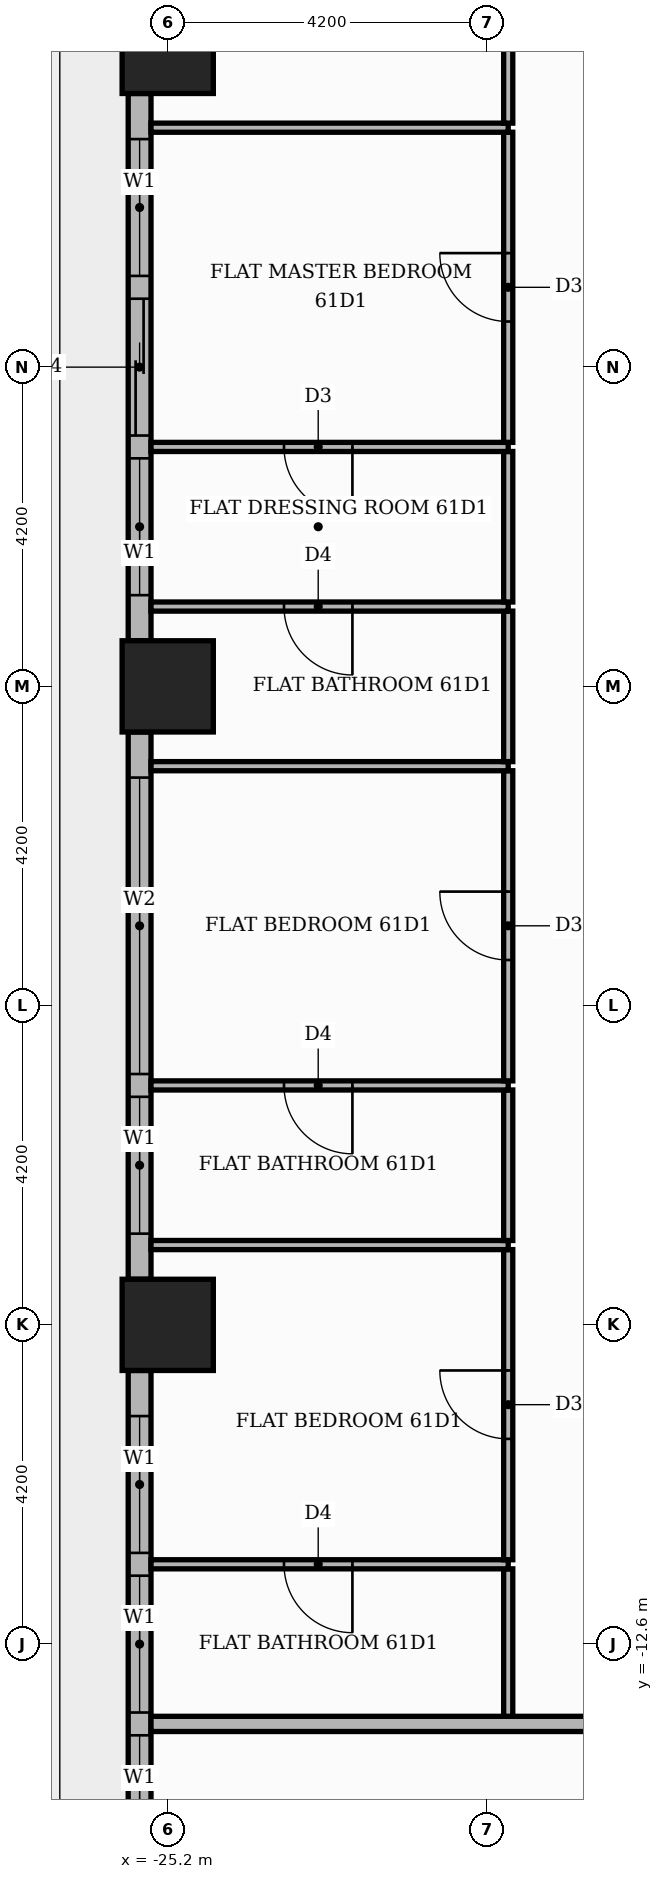
"""IFC4 building model, lengths in metres.
Left out: names, types, materials, properties, quantities, classifications, styles, units other than length and angle.
Written with IfcOpenShell. Run it as: python <this file> out.ifc"""

import sys

from ifc_helpers import new_model, si_unit, direction, frame, frame_2d, origin, origin_2d, place, context, subcontext, project, spatial, rectangle, extrude, element, fill, save


model = new_model("IFC4")
c1 = context("Model", 3, precision=1e-05, world=origin(), true_north=direction((0.0, 1.0)))
c2 = subcontext(c1, "Body", "Model", "MODEL_VIEW")
j1 = project(units=[si_unit("LENGTHUNIT", "METRE"), si_unit("PLANEANGLEUNIT", "RADIAN")], contexts=[c1])
p1 = place(None, origin())
s1 = spatial("IfcSite", under=j1, at=p1, CompositionType="ELEMENT")
p2 = place(p1, origin())
s2 = spatial("IfcBuilding", under=s1, at=p2, CompositionType="ELEMENT")
p3 = place(p2, frame((0.0, 0.0, 256.2)))
s3 = spatial("IfcBuildingStorey", under=s2, at=p3, CompositionType="ELEMENT", Elevation=256.2)
for number, where, z_axis, x_axis in (
    (1, (-25.2, 0.0, 0.0), (0.0, 0.0, 1.0), (1.0, 0.0, 0.0)),
    (2, (-25.2, -8.4, 0.0), (0.0, 0.0, 1.0), (1.0, 0.0, 0.0)),
    (3, (-25.2, 8.4, 0.0), (0.0, 0.0, 1.0), (1.0, 0.0, 0.0)),
):
    element("IfcColumn", number, at=place(p3, frame(where, z_axis=z_axis, x_axis=x_axis)), inside=s3, PredefinedType="COLUMN", context=c2, shape_type="SweptSolid", body=[
        extrude(rectangle(XDim=1.2, YDim=1.2, at=origin_2d()), origin(), (0.0, 0.0, 1.0), 3.9),
    ])
p4 = place(p3, frame((-25.57, 7.8, 0.0), z_axis=(0.0, 0.0, 1.0), x_axis=(0.0, -1.0, 0.0)))
e4 = element("IfcWall", 4, at=p4, inside=s3, PredefinedType="STANDARD", context=c2, shape_type="SweptSolid", body=[
    extrude(rectangle(XDim=7.2, YDim=0.3, at=frame_2d((3.6, 0.0))), origin(), (0.0, 0.0, 1.0), 3.48),
])
p5 = place(p4, frame((0.6, 0.0, 0.9)))
e5 = element("IfcOpeningElement", 5, at=p5, cuts=e4, PredefinedType="OPENING", context=c2, shape_type="SweptSolid", body=[
    extrude(rectangle(XDim=1.8, YDim=2.1, at=frame_2d((0.9, 1.05))), frame((0.0, 0.16, 0.0), z_axis=(0.0, -1.0, 0.0), x_axis=(1.0, 0.0, 0.0)), (0.0, 0.0, 1.0), 0.32),
])
p6 = place(p4, frame((2.7, 0.0, 0.0)))
e6 = element("IfcOpeningElement", 6, at=p6, cuts=e4, PredefinedType="OPENING", context=c2, shape_type="SweptSolid", body=[
    extrude(rectangle(XDim=1.8, YDim=2.4, at=frame_2d((0.9, 1.2))), frame((0.0, 0.16, 0.0), z_axis=(0.0, -1.0, 0.0), x_axis=(1.0, 0.0, 0.0)), (0.0, 0.0, 1.0), 0.32),
])
p7 = place(p4, frame((4.8, 0.0, 0.9)))
e7 = element("IfcOpeningElement", 7, at=p7, cuts=e4, PredefinedType="OPENING", context=c2, shape_type="SweptSolid", body=[
    extrude(rectangle(XDim=1.8, YDim=2.1, at=frame_2d((0.9, 1.05))), frame((0.0, 0.16, 0.0), z_axis=(0.0, -1.0, 0.0), x_axis=(1.0, 0.0, 0.0)), (0.0, 0.0, 1.0), 0.32),
])
p8 = place(p3, frame((-25.57, -0.6, 0.0), z_axis=(0.0, 0.0, 1.0), x_axis=(0.0, -1.0, 0.0)))
e8 = element("IfcWall", 8, at=p8, inside=s3, PredefinedType="STANDARD", context=c2, shape_type="SweptSolid", body=[
    extrude(rectangle(XDim=7.2, YDim=0.3, at=frame_2d((3.6, 0.0))), origin(), (0.0, 0.0, 1.0), 3.48),
])
p9 = place(p8, frame((0.6, 0.0, 0.9)))
e9 = element("IfcOpeningElement", 9, at=p9, cuts=e8, PredefinedType="OPENING", context=c2, shape_type="SweptSolid", body=[
    extrude(rectangle(XDim=3.9, YDim=2.1, at=frame_2d((1.95, 1.05))), frame((0.0, 0.16, 0.0), z_axis=(0.0, -1.0, 0.0), x_axis=(1.0, 0.0, 0.0)), (0.0, 0.0, 1.0), 0.32),
])
p10 = place(p8, frame((4.8, 0.0, 0.9)))
e10 = element("IfcOpeningElement", 10, at=p10, cuts=e8, PredefinedType="OPENING", context=c2, shape_type="SweptSolid", body=[
    extrude(rectangle(XDim=1.8, YDim=2.1, at=frame_2d((0.9, 1.05))), frame((0.0, 0.16, 0.0), z_axis=(0.0, -1.0, 0.0), x_axis=(1.0, 0.0, 0.0)), (0.0, 0.0, 1.0), 0.32),
])
p11 = place(p3, frame((-25.57, -9.0, 0.0), z_axis=(0.0, 0.0, 1.0), x_axis=(0.0, -1.0, 0.0)))
e11 = element("IfcWall", 11, at=p11, inside=s3, PredefinedType="STANDARD", context=c2, shape_type="SweptSolid", body=[
    extrude(rectangle(XDim=7.2, YDim=0.3, at=frame_2d((3.6, 0.0))), origin(), (0.0, 0.0, 1.0), 3.48),
])
p12 = place(p11, frame((0.6, 0.0, 0.9)))
e12 = element("IfcOpeningElement", 12, at=p12, cuts=e11, PredefinedType="OPENING", context=c2, shape_type="SweptSolid", body=[
    extrude(rectangle(XDim=1.8, YDim=2.1, at=frame_2d((0.9, 1.05))), frame((0.0, 0.16, 0.0), z_axis=(0.0, -1.0, 0.0), x_axis=(1.0, 0.0, 0.0)), (0.0, 0.0, 1.0), 0.32),
])
p13 = place(p11, frame((2.7, 0.0, 0.9)))
e13 = element("IfcOpeningElement", 13, at=p13, cuts=e11, PredefinedType="OPENING", context=c2, shape_type="SweptSolid", body=[
    extrude(rectangle(XDim=1.8, YDim=2.1, at=frame_2d((0.9, 1.05))), frame((0.0, 0.16, 0.0), z_axis=(0.0, -1.0, 0.0), x_axis=(1.0, 0.0, 0.0)), (0.0, 0.0, 1.0), 0.32),
])
p14 = place(p11, frame((4.8, 0.0, 0.9)))
e14 = element("IfcOpeningElement", 14, at=p14, cuts=e11, PredefinedType="OPENING", context=c2, shape_type="SweptSolid", body=[
    extrude(rectangle(XDim=1.8, YDim=2.1, at=frame_2d((0.9, 1.05))), frame((0.0, 0.16, 0.0), z_axis=(0.0, -1.0, 0.0), x_axis=(1.0, 0.0, 0.0)), (0.0, 0.0, 1.0), 0.32),
])
p15 = place(p3, frame((-25.42, -13.65, 0.0), z_axis=(0.0, 0.0, 1.0), x_axis=(1.0, 0.0, 0.0)))
e15 = element("IfcWall", 15, at=p15, inside=s3, PredefinedType="PARTITIONING", context=c2, shape_type="SweptSolid", body=[
    extrude(rectangle(XDim=39.07, YDim=0.2, at=frame_2d((19.535, 0.0))), origin(), (0.0, 0.0, 1.0), 3.48),
])
p16 = place(p15, frame((14.37, 0.0, 0.0)))
e16 = element("IfcOpeningElement", 16, at=p16, cuts=e15, PredefinedType="OPENING", context=c2, shape_type="SweptSolid", body=[
    extrude(rectangle(XDim=1.1, YDim=2.4, at=frame_2d((0.55, 1.2))), frame((0.0, 0.11, 0.0), z_axis=(0.0, -1.0, 0.0), x_axis=(1.0, 0.0, 0.0)), (0.0, 0.0, 1.0), 0.22),
])
p17 = place(p3, frame((-20.72, -13.55, 0.0), z_axis=(0.0, 0.0, 1.0), x_axis=(0.0, 1.0, 0.0)))
e17 = element("IfcWall", 17, at=p17, inside=s3, PredefinedType="PARTITIONING", context=c2, shape_type="SweptSolid", body=[
    extrude(rectangle(XDim=1.94, YDim=0.12, at=frame_2d((0.97, 0.0))), origin(), (0.0, 0.0, 1.0), 3.48),
])
p18 = place(p3, frame((-25.42, -11.55, 0.0), z_axis=(0.0, 0.0, 1.0), x_axis=(1.0, 0.0, 0.0)))
e18 = element("IfcWall", 18, at=p18, inside=s3, PredefinedType="PARTITIONING", context=c2, shape_type="SweptSolid", body=[
    extrude(rectangle(XDim=4.7, YDim=0.12, at=frame_2d((2.35, 0.0))), origin(), (0.0, 0.0, 1.0), 3.48),
])
p19 = place(p18, frame((1.75, 0.0, 0.0)))
e19 = element("IfcOpeningElement", 19, at=p19, cuts=e18, PredefinedType="OPENING", context=c2, shape_type="SweptSolid", body=[
    extrude(rectangle(XDim=0.9, YDim=2.1, at=frame_2d((0.45, 1.05))), frame((0.0, 0.07, 0.0), z_axis=(0.0, -1.0, 0.0), x_axis=(1.0, 0.0, 0.0)), (0.0, 0.0, 1.0), 0.14),
])
p20 = place(p3, frame((-20.72, -11.49, 0.0), z_axis=(0.0, 0.0, 1.0), x_axis=(0.0, 1.0, 0.0)))
e20 = element("IfcWall", 20, at=p20, inside=s3, PredefinedType="PARTITIONING", context=c2, shape_type="SweptSolid", body=[
    extrude(rectangle(XDim=4.08, YDim=0.12, at=frame_2d((2.04, 0.0))), origin(), (0.0, 0.0, 1.0), 3.48),
])
p21 = place(p20, frame((1.59, 0.0, 0.0)))
e21 = element("IfcOpeningElement", 21, at=p21, cuts=e20, PredefinedType="OPENING", context=c2, shape_type="SweptSolid", body=[
    extrude(rectangle(XDim=0.9, YDim=2.1, at=frame_2d((0.45, 1.05))), frame((0.0, 0.07, 0.0), z_axis=(0.0, -1.0, 0.0), x_axis=(1.0, 0.0, 0.0)), (0.0, 0.0, 1.0), 0.14),
])
p22 = place(p3, frame((-25.42, -7.35, 0.0), z_axis=(0.0, 0.0, 1.0), x_axis=(1.0, 0.0, 0.0)))
e22 = element("IfcWall", 22, at=p22, inside=s3, PredefinedType="PARTITIONING", context=c2, shape_type="SweptSolid", body=[
    extrude(rectangle(XDim=4.7, YDim=0.12, at=frame_2d((2.35, 0.0))), origin(), (0.0, 0.0, 1.0), 3.48),
])
p23 = place(p3, frame((-20.72, -7.29, 0.0), z_axis=(0.0, 0.0, 1.0), x_axis=(0.0, 1.0, 0.0)))
e23 = element("IfcWall", 23, at=p23, inside=s3, PredefinedType="PARTITIONING", context=c2, shape_type="SweptSolid", body=[
    extrude(rectangle(XDim=1.98, YDim=0.12, at=frame_2d((0.99, 0.0))), origin(), (0.0, 0.0, 1.0), 3.48),
])
p24 = place(p3, frame((-25.42, -5.25, 0.0), z_axis=(0.0, 0.0, 1.0), x_axis=(1.0, 0.0, 0.0)))
e24 = element("IfcWall", 24, at=p24, inside=s3, PredefinedType="PARTITIONING", context=c2, shape_type="SweptSolid", body=[
    extrude(rectangle(XDim=4.7, YDim=0.12, at=frame_2d((2.35, 0.0))), origin(), (0.0, 0.0, 1.0), 3.48),
])
p25 = place(p24, frame((1.75, 0.0, 0.0)))
e25 = element("IfcOpeningElement", 25, at=p25, cuts=e24, PredefinedType="OPENING", context=c2, shape_type="SweptSolid", body=[
    extrude(rectangle(XDim=0.9, YDim=2.1, at=frame_2d((0.45, 1.05))), frame((0.0, 0.07, 0.0), z_axis=(0.0, -1.0, 0.0), x_axis=(1.0, 0.0, 0.0)), (0.0, 0.0, 1.0), 0.14),
])
p26 = place(p3, frame((-20.72, -5.19, 0.0), z_axis=(0.0, 0.0, 1.0), x_axis=(0.0, 1.0, 0.0)))
e26 = element("IfcWall", 26, at=p26, inside=s3, PredefinedType="PARTITIONING", context=c2, shape_type="SweptSolid", body=[
    extrude(rectangle(XDim=4.08, YDim=0.12, at=frame_2d((2.04, 0.0))), origin(), (0.0, 0.0, 1.0), 3.48),
])
p27 = place(p26, frame((1.59, 0.0, 0.0)))
e27 = element("IfcOpeningElement", 27, at=p27, cuts=e26, PredefinedType="OPENING", context=c2, shape_type="SweptSolid", body=[
    extrude(rectangle(XDim=0.9, YDim=2.1, at=frame_2d((0.45, 1.05))), frame((0.0, 0.07, 0.0), z_axis=(0.0, -1.0, 0.0), x_axis=(1.0, 0.0, 0.0)), (0.0, 0.0, 1.0), 0.14),
])
p28 = place(p3, frame((-25.42, -1.05, 0.0), z_axis=(0.0, 0.0, 1.0), x_axis=(1.0, 0.0, 0.0)))
e28 = element("IfcWall", 28, at=p28, inside=s3, PredefinedType="PARTITIONING", context=c2, shape_type="SweptSolid", body=[
    extrude(rectangle(XDim=4.7, YDim=0.12, at=frame_2d((2.35, 0.0))), origin(), (0.0, 0.0, 1.0), 3.48),
])
p29 = place(p3, frame((-20.72, -0.99, 0.0), z_axis=(0.0, 0.0, 1.0), x_axis=(0.0, 1.0, 0.0)))
e29 = element("IfcWall", 29, at=p29, inside=s3, PredefinedType="PARTITIONING", context=c2, shape_type="SweptSolid", body=[
    extrude(rectangle(XDim=1.98, YDim=0.12, at=frame_2d((0.99, 0.0))), origin(), (0.0, 0.0, 1.0), 3.48),
])
p30 = place(p3, frame((-25.42, 1.05, 0.0), z_axis=(0.0, 0.0, 1.0), x_axis=(1.0, 0.0, 0.0)))
e30 = element("IfcWall", 30, at=p30, inside=s3, PredefinedType="PARTITIONING", context=c2, shape_type="SweptSolid", body=[
    extrude(rectangle(XDim=4.7, YDim=0.12, at=frame_2d((2.35, 0.0))), origin(), (0.0, 0.0, 1.0), 3.48),
])
p31 = place(p30, frame((1.75, 0.0, 0.0)))
e31 = element("IfcOpeningElement", 31, at=p31, cuts=e30, PredefinedType="OPENING", context=c2, shape_type="SweptSolid", body=[
    extrude(rectangle(XDim=0.9, YDim=2.1, at=frame_2d((0.45, 1.05))), frame((0.0, 0.07, 0.0), z_axis=(0.0, -1.0, 0.0), x_axis=(1.0, 0.0, 0.0)), (0.0, 0.0, 1.0), 0.14),
])
p32 = place(p3, frame((-20.72, 1.11, 0.0), z_axis=(0.0, 0.0, 1.0), x_axis=(0.0, 1.0, 0.0)))
e32 = element("IfcWall", 32, at=p32, inside=s3, PredefinedType="PARTITIONING", context=c2, shape_type="SweptSolid", body=[
    extrude(rectangle(XDim=1.98, YDim=0.12, at=frame_2d((0.99, 0.0))), origin(), (0.0, 0.0, 1.0), 3.48),
])
p33 = place(p3, frame((-25.42, 3.15, 0.0), z_axis=(0.0, 0.0, 1.0), x_axis=(1.0, 0.0, 0.0)))
e33 = element("IfcWall", 33, at=p33, inside=s3, PredefinedType="PARTITIONING", context=c2, shape_type="SweptSolid", body=[
    extrude(rectangle(XDim=4.7, YDim=0.12, at=frame_2d((2.35, 0.0))), origin(), (0.0, 0.0, 1.0), 3.48),
])
p34 = place(p33, frame((1.75, 0.0, 0.0)))
e34 = element("IfcOpeningElement", 34, at=p34, cuts=e33, PredefinedType="OPENING", context=c2, shape_type="SweptSolid", body=[
    extrude(rectangle(XDim=0.9, YDim=2.1, at=frame_2d((0.45, 1.05))), frame((0.0, 0.07, 0.0), z_axis=(0.0, -1.0, 0.0), x_axis=(1.0, 0.0, 0.0)), (0.0, 0.0, 1.0), 0.14),
])
p35 = place(p3, frame((-20.72, 3.21, 0.0), z_axis=(0.0, 0.0, 1.0), x_axis=(0.0, 1.0, 0.0)))
e35 = element("IfcWall", 35, at=p35, inside=s3, PredefinedType="PARTITIONING", context=c2, shape_type="SweptSolid", body=[
    extrude(rectangle(XDim=4.08, YDim=0.12, at=frame_2d((2.04, 0.0))), origin(), (0.0, 0.0, 1.0), 3.48),
])
p36 = place(p35, frame((1.59, 0.0, 0.0)))
e36 = element("IfcOpeningElement", 36, at=p36, cuts=e35, PredefinedType="OPENING", context=c2, shape_type="SweptSolid", body=[
    extrude(rectangle(XDim=0.9, YDim=2.1, at=frame_2d((0.45, 1.05))), frame((0.0, 0.07, 0.0), z_axis=(0.0, -1.0, 0.0), x_axis=(1.0, 0.0, 0.0)), (0.0, 0.0, 1.0), 0.14),
])
p37 = place(p3, frame((-25.42, 7.35, 0.0), z_axis=(0.0, 0.0, 1.0), x_axis=(1.0, 0.0, 0.0)))
e37 = element("IfcWall", 37, at=p37, inside=s3, PredefinedType="PARTITIONING", context=c2, shape_type="SweptSolid", body=[
    extrude(rectangle(XDim=4.7, YDim=0.12, at=frame_2d((2.35, 0.0))), origin(), (0.0, 0.0, 1.0), 3.48),
])
p38 = place(p3, frame((-20.72, 7.41, 0.0), z_axis=(0.0, 0.0, 1.0), x_axis=(0.0, 1.0, 0.0)))
e38 = element("IfcWall", 38, at=p38, inside=s3, PredefinedType="PARTITIONING", context=c2, shape_type="SweptSolid", body=[
    extrude(rectangle(XDim=4.08, YDim=0.12, at=frame_2d((2.04, 0.0))), origin(), (0.0, 0.0, 1.0), 3.48),
])
p39 = place(p38, frame((1.59, 0.0, 0.0)))
e39 = element("IfcOpeningElement", 39, at=p39, cuts=e38, PredefinedType="OPENING", context=c2, shape_type="SweptSolid", body=[
    extrude(rectangle(XDim=0.9, YDim=2.1, at=frame_2d((0.45, 1.05))), frame((0.0, 0.07, 0.0), z_axis=(0.0, -1.0, 0.0), x_axis=(1.0, 0.0, 0.0)), (0.0, 0.0, 1.0), 0.14),
])
p40 = place(p5, origin())
e40 = element("IfcWindow", 40, at=p40, inside=s3, PartitioningType="SINGLE_PANEL", PredefinedType="WINDOW", context=c2, shape_type="SweptSolid", body=[
    extrude(rectangle(XDim=1.8, YDim=2.1, at=frame_2d((0.9, 1.05))), frame((0.0, 0.03, 0.0), z_axis=(0.0, -1.0, 0.0), x_axis=(1.0, 0.0, 0.0)), (0.0, 0.0, 1.0), 0.06),
])
fill(e5, e40)
p41 = place(p6, origin())
e41 = element("IfcDoor", 41, at=p41, inside=s3, OperationType="SLIDING_TO_LEFT", PredefinedType="DOOR", context=c2, shape_type="SweptSolid", body=[
    extrude(rectangle(XDim=1.8, YDim=2.4, at=frame_2d((0.9, 1.2))), frame((0.0, 0.025, 0.0), z_axis=(0.0, -1.0, 0.0), x_axis=(1.0, 0.0, 0.0)), (0.0, 0.0, 1.0), 0.05),
])
fill(e6, e41)
p42 = place(p7, origin())
e42 = element("IfcWindow", 42, at=p42, inside=s3, PartitioningType="SINGLE_PANEL", PredefinedType="WINDOW", context=c2, shape_type="SweptSolid", body=[
    extrude(rectangle(XDim=1.8, YDim=2.1, at=frame_2d((0.9, 1.05))), frame((0.0, 0.03, 0.0), z_axis=(0.0, -1.0, 0.0), x_axis=(1.0, 0.0, 0.0)), (0.0, 0.0, 1.0), 0.06),
])
fill(e7, e42)
p43 = place(p9, origin())
e43 = element("IfcWindow", 43, at=p43, inside=s3, PartitioningType="SINGLE_PANEL", PredefinedType="WINDOW", context=c2, shape_type="SweptSolid", body=[
    extrude(rectangle(XDim=3.9, YDim=2.1, at=frame_2d((1.95, 1.05))), frame((0.0, 0.03, 0.0), z_axis=(0.0, -1.0, 0.0), x_axis=(1.0, 0.0, 0.0)), (0.0, 0.0, 1.0), 0.06),
])
fill(e9, e43)
p44 = place(p10, origin())
e44 = element("IfcWindow", 44, at=p44, inside=s3, PartitioningType="SINGLE_PANEL", PredefinedType="WINDOW", context=c2, shape_type="SweptSolid", body=[
    extrude(rectangle(XDim=1.8, YDim=2.1, at=frame_2d((0.9, 1.05))), frame((0.0, 0.03, 0.0), z_axis=(0.0, -1.0, 0.0), x_axis=(1.0, 0.0, 0.0)), (0.0, 0.0, 1.0), 0.06),
])
fill(e10, e44)
p45 = place(p12, origin())
e45 = element("IfcWindow", 45, at=p45, inside=s3, PartitioningType="SINGLE_PANEL", PredefinedType="WINDOW", context=c2, shape_type="SweptSolid", body=[
    extrude(rectangle(XDim=1.8, YDim=2.1, at=frame_2d((0.9, 1.05))), frame((0.0, 0.03, 0.0), z_axis=(0.0, -1.0, 0.0), x_axis=(1.0, 0.0, 0.0)), (0.0, 0.0, 1.0), 0.06),
])
fill(e12, e45)
p46 = place(p13, origin())
e46 = element("IfcWindow", 46, at=p46, inside=s3, PartitioningType="SINGLE_PANEL", PredefinedType="WINDOW", context=c2, shape_type="SweptSolid", body=[
    extrude(rectangle(XDim=1.8, YDim=2.1, at=frame_2d((0.9, 1.05))), frame((0.0, 0.03, 0.0), z_axis=(0.0, -1.0, 0.0), x_axis=(1.0, 0.0, 0.0)), (0.0, 0.0, 1.0), 0.06),
])
fill(e13, e46)
p47 = place(p14, origin())
e47 = element("IfcWindow", 47, at=p47, inside=s3, PartitioningType="SINGLE_PANEL", PredefinedType="WINDOW", context=c2, shape_type="SweptSolid", body=[
    extrude(rectangle(XDim=1.8, YDim=2.1, at=frame_2d((0.9, 1.05))), frame((0.0, 0.03, 0.0), z_axis=(0.0, -1.0, 0.0), x_axis=(1.0, 0.0, 0.0)), (0.0, 0.0, 1.0), 0.06),
])
fill(e14, e47)
p48 = place(p36, origin())
e48 = element("IfcDoor", 48, at=p48, inside=s3, OperationType="SINGLE_SWING_RIGHT", PredefinedType="DOOR", context=c2, shape_type="SweptSolid", body=[
    extrude(rectangle(XDim=0.9, YDim=2.1, at=frame_2d((0.45, 1.05))), frame((0.0, 0.025, 0.0), z_axis=(0.0, -1.0, 0.0), x_axis=(1.0, 0.0, 0.0)), (0.0, 0.0, 1.0), 0.05),
])
fill(e36, e48)
p49 = place(p34, frame((0.9, 0.0, 0.0), z_axis=(0.0, 0.0, 1.0), x_axis=(-1.0, 0.0, 0.0)))
e49 = element("IfcDoor", 49, at=p49, inside=s3, OperationType="SINGLE_SWING_RIGHT", PredefinedType="DOOR", context=c2, shape_type="SweptSolid", body=[
    extrude(rectangle(XDim=0.9, YDim=2.1, at=frame_2d((0.45, 1.05))), frame((0.0, 0.025, 0.0), z_axis=(0.0, -1.0, 0.0), x_axis=(1.0, 0.0, 0.0)), (0.0, 0.0, 1.0), 0.05),
])
fill(e34, e49)
p50 = place(p31, frame((0.9, 0.0, 0.0), z_axis=(0.0, 0.0, 1.0), x_axis=(-1.0, 0.0, 0.0)))
e50 = element("IfcDoor", 50, at=p50, inside=s3, OperationType="SINGLE_SWING_RIGHT", PredefinedType="DOOR", context=c2, shape_type="SweptSolid", body=[
    extrude(rectangle(XDim=0.9, YDim=2.1, at=frame_2d((0.45, 1.05))), frame((0.0, 0.025, 0.0), z_axis=(0.0, -1.0, 0.0), x_axis=(1.0, 0.0, 0.0)), (0.0, 0.0, 1.0), 0.05),
])
fill(e31, e50)
p51 = place(p27, origin())
e51 = element("IfcDoor", 51, at=p51, inside=s3, OperationType="SINGLE_SWING_RIGHT", PredefinedType="DOOR", context=c2, shape_type="SweptSolid", body=[
    extrude(rectangle(XDim=0.9, YDim=2.1, at=frame_2d((0.45, 1.05))), frame((0.0, 0.025, 0.0), z_axis=(0.0, -1.0, 0.0), x_axis=(1.0, 0.0, 0.0)), (0.0, 0.0, 1.0), 0.05),
])
fill(e27, e51)
p52 = place(p25, frame((0.9, 0.0, 0.0), z_axis=(0.0, 0.0, 1.0), x_axis=(-1.0, 0.0, 0.0)))
e52 = element("IfcDoor", 52, at=p52, inside=s3, OperationType="SINGLE_SWING_RIGHT", PredefinedType="DOOR", context=c2, shape_type="SweptSolid", body=[
    extrude(rectangle(XDim=0.9, YDim=2.1, at=frame_2d((0.45, 1.05))), frame((0.0, 0.025, 0.0), z_axis=(0.0, -1.0, 0.0), x_axis=(1.0, 0.0, 0.0)), (0.0, 0.0, 1.0), 0.05),
])
fill(e25, e52)
p53 = place(p21, origin())
e53 = element("IfcDoor", 53, at=p53, inside=s3, OperationType="SINGLE_SWING_RIGHT", PredefinedType="DOOR", context=c2, shape_type="SweptSolid", body=[
    extrude(rectangle(XDim=0.9, YDim=2.1, at=frame_2d((0.45, 1.05))), frame((0.0, 0.025, 0.0), z_axis=(0.0, -1.0, 0.0), x_axis=(1.0, 0.0, 0.0)), (0.0, 0.0, 1.0), 0.05),
])
fill(e21, e53)
p54 = place(p19, frame((0.9, 0.0, 0.0), z_axis=(0.0, 0.0, 1.0), x_axis=(-1.0, 0.0, 0.0)))
e54 = element("IfcDoor", 54, at=p54, inside=s3, OperationType="SINGLE_SWING_RIGHT", PredefinedType="DOOR", context=c2, shape_type="SweptSolid", body=[
    extrude(rectangle(XDim=0.9, YDim=2.1, at=frame_2d((0.45, 1.05))), frame((0.0, 0.025, 0.0), z_axis=(0.0, -1.0, 0.0), x_axis=(1.0, 0.0, 0.0)), (0.0, 0.0, 1.0), 0.05),
])
fill(e19, e54)
save(model, sys.argv[1])
